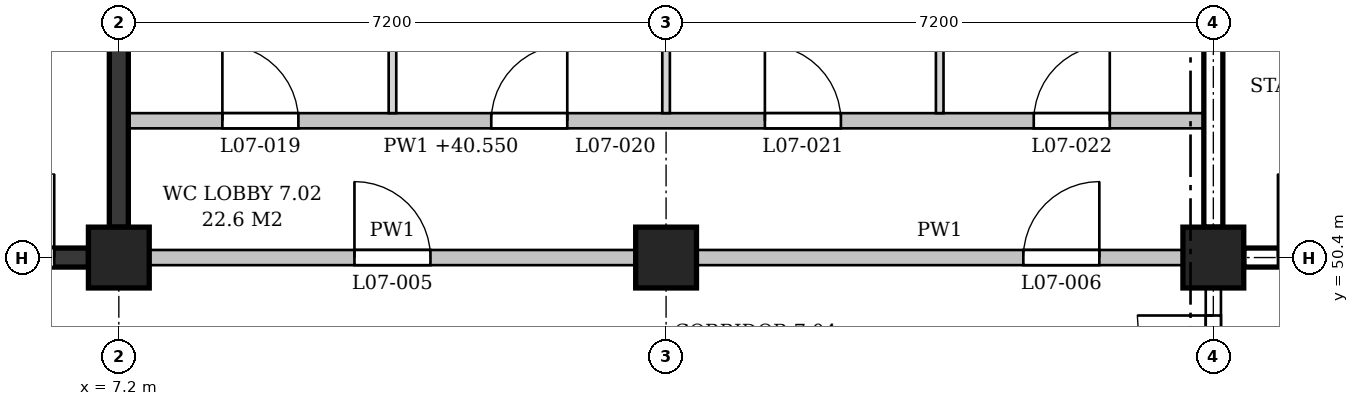
"""IFC4 building model, lengths in metres.
Left out: names, types, materials, properties, quantities, classifications, styles, units other than length and angle.
Written with IfcOpenShell. Run it as: python <this file> out.ifc"""

import sys

from ifc_helpers import new_model, si_unit, direction, frame, frame_2d, origin, origin_2d, place, context, subcontext, project, spatial, polyline, rectangle, outline, extrude, element, fill, save


model = new_model("IFC4")
c1 = context("Model", 3, precision=1e-05, world=origin(), true_north=direction((0.0, 1.0)))
c2 = subcontext(c1, "Body", "Model", "MODEL_VIEW")
j1 = project(units=[si_unit("LENGTHUNIT", "METRE"), si_unit("PLANEANGLEUNIT", "RADIAN")], contexts=[c1])
p1 = place(None, origin())
s1 = spatial("IfcSite", under=j1, at=p1, CompositionType="ELEMENT")
p2 = place(p1, origin())
s2 = spatial("IfcBuilding", under=s1, at=p2, CompositionType="ELEMENT")
p3 = place(p2, frame((0.0, 0.0, 36.0)))
s3 = spatial("IfcBuildingStorey", under=s2, at=p3, CompositionType="ELEMENT", Elevation=36.0)
for number, where, z_axis, x_axis in (
    (1, (7.2, 50.4, 0.0), (0.0, 0.0, 1.0), (1.0, 0.0, 0.0)),
    (2, (14.4, 50.4, 0.0), (0.0, 0.0, 1.0), (1.0, 0.0, 0.0)),
    (3, (21.6, 50.4, 0.0), (0.0, 0.0, 1.0), (1.0, 0.0, 0.0)),
):
    element("IfcColumn", number, at=place(p3, frame(where, z_axis=z_axis, x_axis=x_axis)), inside=s3, PredefinedType="COLUMN", context=c2, shape_type="SweptSolid", body=[
        extrude(rectangle(XDim=0.8, YDim=0.8, at=origin_2d()), origin(), (0.0, 0.0, 1.0), 4.8),
    ])
p4 = place(p3, frame((0.4, 50.4, 0.0), z_axis=(0.0, 0.0, 1.0), x_axis=(1.0, 0.0, 0.0)))
e4 = element("IfcWall", 4, at=p4, inside=s3, PredefinedType="SHEAR", context=c2, shape_type="SweptSolid", body=[
    extrude(rectangle(XDim=6.4, YDim=0.25, at=frame_2d((3.2, 0.0))), origin(), (0.0, 0.0, 1.0), 3.85),
])
p5 = place(p4, frame((4.85, 0.0, 0.0)))
e5 = element("IfcOpeningElement", 5, at=p5, cuts=e4, PredefinedType="OPENING", context=c2, shape_type="SweptSolid", body=[
    extrude(rectangle(XDim=1.1, YDim=2.1, at=frame_2d((0.55, 1.05))), frame((0.0, 0.135, 0.0), z_axis=(0.0, -1.0, 0.0), x_axis=(1.0, 0.0, 0.0)), (0.0, 0.0, 1.0), 0.27),
])
p6 = place(p3, frame((7.2, 50.8, 0.0), z_axis=(0.0, 0.0, 1.0), x_axis=(0.0, 1.0, 0.0)))
e6 = element("IfcWall", 6, at=p6, inside=s3, PredefinedType="SHEAR", context=c2, shape_type="SweptSolid", body=[
    extrude(rectangle(XDim=6.4, YDim=0.25, at=frame_2d((3.2, 0.0))), origin(), (0.0, 0.0, 1.0), 3.85),
])
p7 = place(p3, frame((22.0, 50.4, 0.0), z_axis=(0.0, 0.0, 1.0), x_axis=(1.0, 0.0, 0.0)))
e7 = element("IfcWall", 7, at=p7, inside=s3, PredefinedType="SHEAR", context=c2, shape_type="SweptSolid", body=[
    extrude(rectangle(XDim=6.4, YDim=0.25, at=frame_2d((3.2, 0.0))), origin(), (0.0, 0.0, 1.0), 3.85),
])
p8 = place(p7, frame((0.45, 0.0, 0.0)))
e8 = element("IfcOpeningElement", 8, at=p8, cuts=e7, PredefinedType="OPENING", context=c2, shape_type="SweptSolid", body=[
    extrude(rectangle(XDim=1.1, YDim=2.1, at=frame_2d((0.55, 1.05))), frame((0.0, 0.135, 0.0), z_axis=(0.0, -1.0, 0.0), x_axis=(1.0, 0.0, 0.0)), (0.0, 0.0, 1.0), 0.27),
])
p9 = place(p3, frame((21.6, 50.8, 0.0), z_axis=(0.0, 0.0, 1.0), x_axis=(0.0, 1.0, 0.0)))
e9 = element("IfcWall", 9, at=p9, inside=s3, PredefinedType="SHEAR", context=c2, shape_type="SweptSolid", body=[
    extrude(rectangle(XDim=6.4, YDim=0.25, at=frame_2d((3.2, 0.0))), origin(), (0.0, 0.0, 1.0), 3.85),
])
p10 = place(p3, frame((7.6, 50.4, 0.0), z_axis=(0.0, 0.0, 1.0), x_axis=(1.0, 0.0, 0.0)))
e10 = element("IfcWall", 10, at=p10, inside=s3, PredefinedType="PARTITIONING", context=c2, shape_type="SweptSolid", body=[
    extrude(rectangle(XDim=6.4, YDim=0.2, at=frame_2d((3.2, 0.0))), origin(), (0.0, 0.0, 1.0), 3.85),
])
p11 = place(p10, frame((2.7, 0.0, 0.0)))
e11 = element("IfcOpeningElement", 11, at=p11, cuts=e10, PredefinedType="OPENING", context=c2, shape_type="SweptSolid", body=[
    extrude(rectangle(XDim=1.0, YDim=2.1, at=frame_2d((0.5, 1.05))), frame((0.0, 0.11, 0.0), z_axis=(0.0, -1.0, 0.0), x_axis=(1.0, 0.0, 0.0)), (0.0, 0.0, 1.0), 0.22),
])
p12 = place(p3, frame((14.8, 50.4, 0.0), z_axis=(0.0, 0.0, 1.0), x_axis=(1.0, 0.0, 0.0)))
e12 = element("IfcWall", 12, at=p12, inside=s3, PredefinedType="PARTITIONING", context=c2, shape_type="SweptSolid", body=[
    extrude(rectangle(XDim=6.4, YDim=0.2, at=frame_2d((3.2, 0.0))), origin(), (0.0, 0.0, 1.0), 3.85),
])
p13 = place(p12, frame((4.3, 0.0, 0.0)))
e13 = element("IfcOpeningElement", 13, at=p13, cuts=e12, PredefinedType="OPENING", context=c2, shape_type="SweptSolid", body=[
    extrude(rectangle(XDim=1.0, YDim=2.1, at=frame_2d((0.5, 1.05))), frame((0.0, 0.11, 0.0), z_axis=(0.0, -1.0, 0.0), x_axis=(1.0, 0.0, 0.0)), (0.0, 0.0, 1.0), 0.22),
])
p14 = place(p3, frame((7.325, 52.2, 0.0), z_axis=(0.0, 0.0, 1.0), x_axis=(1.0, 0.0, 0.0)))
e14 = element("IfcWall", 14, at=p14, inside=s3, PredefinedType="PARTITIONING", context=c2, shape_type="SweptSolid", body=[
    extrude(outline(polyline([(0.0, 0.0), (14.15, 0.0), (14.15, 3.85), (14.05, 3.85), (14.05, 4.55), (7.3, 4.55), (7.3, 3.85), (6.85, 3.85), (6.85, 4.55), (0.1, 4.55), (0.1, 3.85), (0.0, 3.85), (0.0, 0.0)])), frame((0.0, 0.1, 0.0), z_axis=(0.0, -1.0, 0.0), x_axis=(1.0, 0.0, 0.0)), (0.0, 0.0, 1.0), 0.2),
])
p15 = place(p14, frame((1.238, 0.0, 0.0)))
e15 = element("IfcOpeningElement", 15, at=p15, cuts=e14, PredefinedType="OPENING", context=c2, shape_type="SweptSolid", body=[
    extrude(rectangle(XDim=1.0, YDim=2.1, at=frame_2d((0.5, 1.05))), frame((0.0, 0.11, 0.0), z_axis=(0.0, -1.0, 0.0), x_axis=(1.0, 0.0, 0.0)), (0.0, 0.0, 1.0), 0.22),
])
p16 = place(p14, frame((4.775, 0.0, 0.0)))
e16 = element("IfcOpeningElement", 16, at=p16, cuts=e14, PredefinedType="OPENING", context=c2, shape_type="SweptSolid", body=[
    extrude(rectangle(XDim=1.0, YDim=2.1, at=frame_2d((0.5, 1.05))), frame((0.0, 0.11, 0.0), z_axis=(0.0, -1.0, 0.0), x_axis=(1.0, 0.0, 0.0)), (0.0, 0.0, 1.0), 0.22),
])
p17 = place(p14, frame((8.375, 0.0, 0.0)))
e17 = element("IfcOpeningElement", 17, at=p17, cuts=e14, PredefinedType="OPENING", context=c2, shape_type="SweptSolid", body=[
    extrude(rectangle(XDim=1.0, YDim=2.1, at=frame_2d((0.5, 1.05))), frame((0.0, 0.11, 0.0), z_axis=(0.0, -1.0, 0.0), x_axis=(1.0, 0.0, 0.0)), (0.0, 0.0, 1.0), 0.22),
])
p18 = place(p14, frame((11.913, 0.0, 0.0)))
e18 = element("IfcOpeningElement", 18, at=p18, cuts=e14, PredefinedType="OPENING", context=c2, shape_type="SweptSolid", body=[
    extrude(rectangle(XDim=1.0, YDim=2.1, at=frame_2d((0.5, 1.05))), frame((0.0, 0.11, 0.0), z_axis=(0.0, -1.0, 0.0), x_axis=(1.0, 0.0, 0.0)), (0.0, 0.0, 1.0), 0.22),
])
p19 = place(p3, frame((10.8, 52.3, 0.0), z_axis=(0.0, 0.0, 1.0), x_axis=(0.0, 1.0, 0.0)))
e19 = element("IfcWall", 19, at=p19, inside=s3, PredefinedType="PARTITIONING", context=c2, shape_type="SweptSolid", body=[
    extrude(rectangle(XDim=5.15, YDim=0.1, at=frame_2d((2.575, 0.0))), origin(), (0.0, 0.0, 1.0), 3.85),
])
p20 = place(p3, frame((14.4, 52.3, 0.0), z_axis=(0.0, 0.0, 1.0), x_axis=(0.0, 1.0, 0.0)))
e20 = element("IfcWall", 20, at=p20, inside=s3, PredefinedType="PARTITIONING", context=c2, shape_type="SweptSolid", body=[
    extrude(rectangle(XDim=4.9, YDim=0.1, at=frame_2d((2.45, 0.0))), origin(), (0.0, 0.0, 1.0), 3.85),
])
p21 = place(p3, frame((18.0, 52.3, 0.0), z_axis=(0.0, 0.0, 1.0), x_axis=(0.0, 1.0, 0.0)))
e21 = element("IfcWall", 21, at=p21, inside=s3, PredefinedType="PARTITIONING", context=c2, shape_type="SweptSolid", body=[
    extrude(rectangle(XDim=5.15, YDim=0.1, at=frame_2d((2.575, 0.0))), origin(), (0.0, 0.0, 1.0), 3.85),
])
p22 = place(p3, frame((21.6, 47.275, 0.0), z_axis=(0.0, 0.0, 1.0), x_axis=(0.0, 1.0, 0.0)))
e22 = element("IfcWall", 22, at=p22, inside=s3, PredefinedType="PARTITIONING", context=c2, shape_type="SweptSolid", body=[
    extrude(rectangle(XDim=2.725, YDim=0.2, at=frame_2d((1.363, 0.0))), origin(), (0.0, 0.0, 1.0), 3.85),
])
p23 = place(p22, frame((0.363, 0.0, 0.0)))
e23 = element("IfcOpeningElement", 23, at=p23, cuts=e22, PredefinedType="OPENING", context=c2, shape_type="SweptSolid", body=[
    extrude(rectangle(XDim=2.0, YDim=2.4, at=frame_2d((1.0, 1.2))), frame((0.0, 0.11, 0.0), z_axis=(0.0, -1.0, 0.0), x_axis=(1.0, 0.0, 0.0)), (0.0, 0.0, 1.0), 0.22),
])
p24 = place(p5, origin())
e24 = element("IfcDoor", 24, at=p24, inside=s3, OperationType="SINGLE_SWING_RIGHT", PredefinedType="DOOR", context=c2, shape_type="SweptSolid", body=[
    extrude(rectangle(XDim=1.1, YDim=2.1, at=frame_2d((0.55, 1.05))), frame((0.0, 0.025, 0.0), z_axis=(0.0, -1.0, 0.0), x_axis=(1.0, 0.0, 0.0)), (0.0, 0.0, 1.0), 0.05),
])
fill(e5, e24)
p25 = place(p8, origin())
e25 = element("IfcDoor", 25, at=p25, inside=s3, OperationType="SINGLE_SWING_LEFT", PredefinedType="DOOR", context=c2, shape_type="SweptSolid", body=[
    extrude(rectangle(XDim=1.1, YDim=2.1, at=frame_2d((0.55, 1.05))), frame((0.0, 0.025, 0.0), z_axis=(0.0, -1.0, 0.0), x_axis=(1.0, 0.0, 0.0)), (0.0, 0.0, 1.0), 0.05),
])
fill(e8, e25)
p26 = place(p23, origin())
e26 = element("IfcDoor", 26, at=p26, inside=s3, OperationType="DOUBLE_DOOR_SINGLE_SWING", PredefinedType="DOOR", context=c2, shape_type="SweptSolid", body=[
    extrude(rectangle(XDim=2.0, YDim=2.4, at=frame_2d((1.0, 1.2))), frame((0.0, 0.025, 0.0), z_axis=(0.0, -1.0, 0.0), x_axis=(1.0, 0.0, 0.0)), (0.0, 0.0, 1.0), 0.05),
])
fill(e23, e26)
p27 = place(p11, origin())
e27 = element("IfcDoor", 27, at=p27, inside=s3, OperationType="SINGLE_SWING_LEFT", PredefinedType="DOOR", context=c2, shape_type="SweptSolid", body=[
    extrude(rectangle(XDim=1.0, YDim=2.1, at=frame_2d((0.5, 1.05))), frame((0.0, 0.025, 0.0), z_axis=(0.0, -1.0, 0.0), x_axis=(1.0, 0.0, 0.0)), (0.0, 0.0, 1.0), 0.05),
])
fill(e11, e27)
p28 = place(p13, origin())
e28 = element("IfcDoor", 28, at=p28, inside=s3, OperationType="SINGLE_SWING_RIGHT", PredefinedType="DOOR", context=c2, shape_type="SweptSolid", body=[
    extrude(rectangle(XDim=1.0, YDim=2.1, at=frame_2d((0.5, 1.05))), frame((0.0, 0.025, 0.0), z_axis=(0.0, -1.0, 0.0), x_axis=(1.0, 0.0, 0.0)), (0.0, 0.0, 1.0), 0.05),
])
fill(e13, e28)
p29 = place(p15, origin())
e29 = element("IfcDoor", 29, at=p29, inside=s3, OperationType="SINGLE_SWING_LEFT", PredefinedType="DOOR", context=c2, shape_type="SweptSolid", body=[
    extrude(rectangle(XDim=1.0, YDim=2.1, at=frame_2d((0.5, 1.05))), frame((0.0, 0.025, 0.0), z_axis=(0.0, -1.0, 0.0), x_axis=(1.0, 0.0, 0.0)), (0.0, 0.0, 1.0), 0.05),
])
fill(e15, e29)
p30 = place(p16, origin())
e30 = element("IfcDoor", 30, at=p30, inside=s3, OperationType="SINGLE_SWING_RIGHT", PredefinedType="DOOR", context=c2, shape_type="SweptSolid", body=[
    extrude(rectangle(XDim=1.0, YDim=2.1, at=frame_2d((0.5, 1.05))), frame((0.0, 0.025, 0.0), z_axis=(0.0, -1.0, 0.0), x_axis=(1.0, 0.0, 0.0)), (0.0, 0.0, 1.0), 0.05),
])
fill(e16, e30)
p31 = place(p17, origin())
e31 = element("IfcDoor", 31, at=p31, inside=s3, OperationType="SINGLE_SWING_LEFT", PredefinedType="DOOR", context=c2, shape_type="SweptSolid", body=[
    extrude(rectangle(XDim=1.0, YDim=2.1, at=frame_2d((0.5, 1.05))), frame((0.0, 0.025, 0.0), z_axis=(0.0, -1.0, 0.0), x_axis=(1.0, 0.0, 0.0)), (0.0, 0.0, 1.0), 0.05),
])
fill(e17, e31)
p32 = place(p18, origin())
e32 = element("IfcDoor", 32, at=p32, inside=s3, OperationType="SINGLE_SWING_RIGHT", PredefinedType="DOOR", context=c2, shape_type="SweptSolid", body=[
    extrude(rectangle(XDim=1.0, YDim=2.1, at=frame_2d((0.5, 1.05))), frame((0.0, 0.025, 0.0), z_axis=(0.0, -1.0, 0.0), x_axis=(1.0, 0.0, 0.0)), (0.0, 0.0, 1.0), 0.05),
])
fill(e18, e32)
save(model, sys.argv[1])
